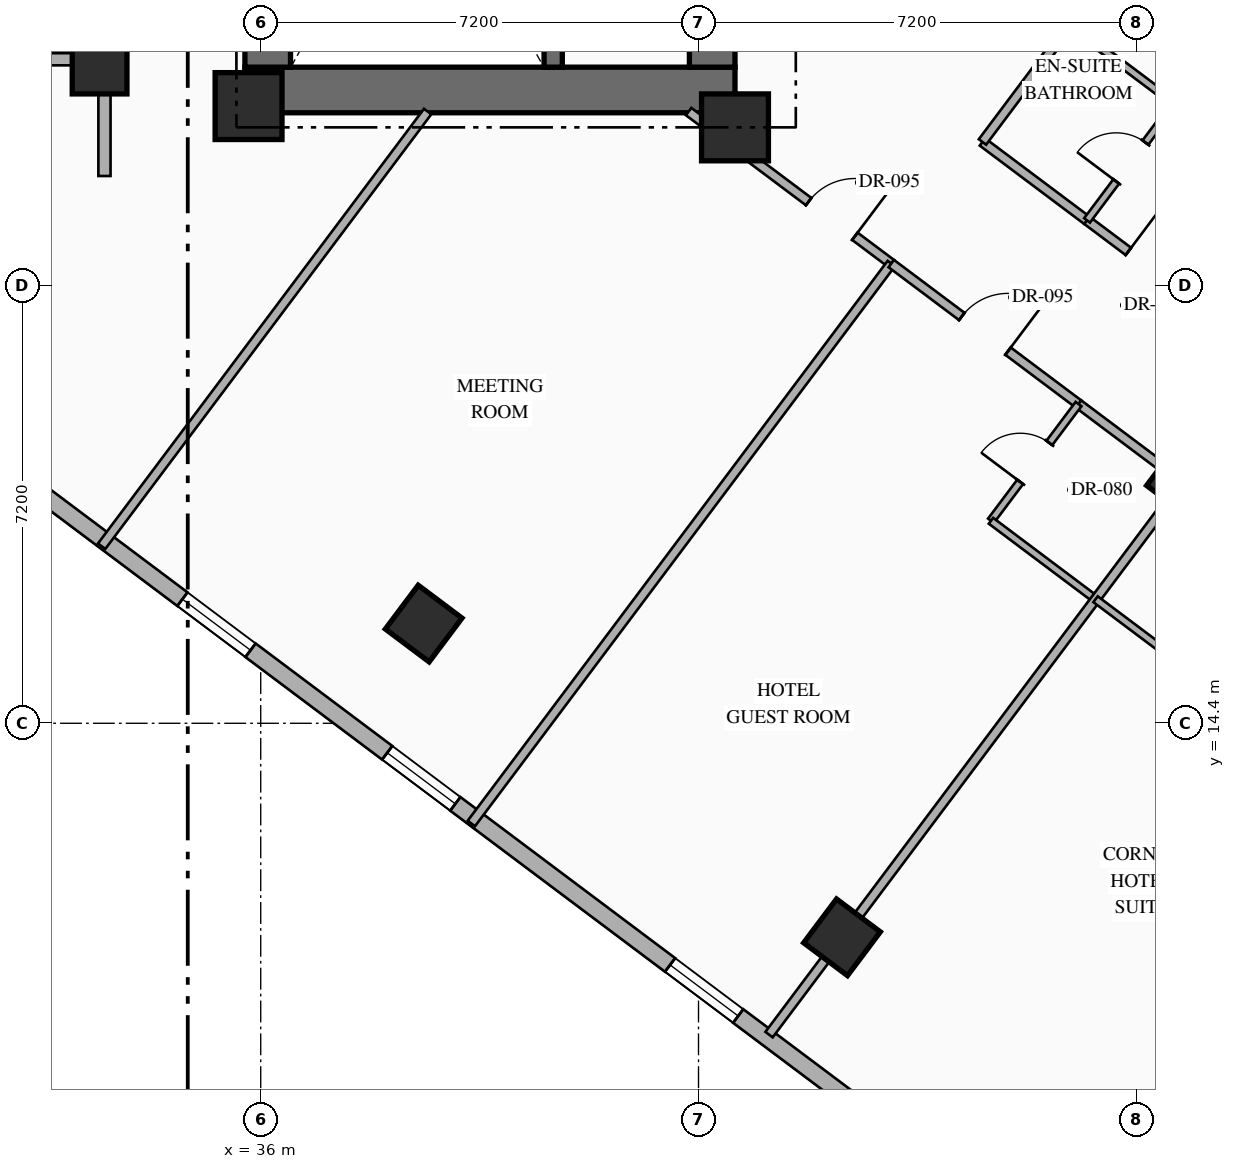
"""IFC4 building model, lengths in metres.
Left out: names, types, materials, properties, quantities, classifications, styles, units other than length and angle.
Written with IfcOpenShell. Run it as: python <this file> out.ifc"""

import sys

from ifc_helpers import new_model, si_unit, direction, frame, frame_2d, origin, origin_2d, place, context, subcontext, project, spatial, rectangle, hollow_rectangle, extrude, element, fill, save


model = new_model("IFC4")
c1 = context("Model", 3, precision=1e-05, world=origin(), true_north=direction((0.0, 1.0)))
c2 = subcontext(c1, "Body", "Model", "MODEL_VIEW")
j1 = project(units=[si_unit("LENGTHUNIT", "METRE"), si_unit("PLANEANGLEUNIT", "RADIAN")], contexts=[c1])
p1 = place(None, origin())
s1 = spatial("IfcSite", under=j1, at=p1, CompositionType="ELEMENT")
p2 = place(p1, origin())
s2 = spatial("IfcBuilding", under=s1, at=p2, CompositionType="ELEMENT")
p3 = place(p2, frame((0.0, 0.0, 74.6)))
s3 = spatial("IfcBuildingStorey", under=s2, at=p3, CompositionType="ELEMENT", Elevation=74.6)
p4 = place(p3, frame((35.74, 24.815, 0.0), z_axis=(0.0, 0.0, 1.0), x_axis=(1.0, 0.0, 0.0)))
e1 = element("IfcWall", 1, at=p4, inside=s3, PredefinedType="SHEAR", context=c2, shape_type="SweptSolid", body=[
    extrude(rectangle(XDim=8.06, YDim=0.75, at=frame_2d((4.03, 0.0))), origin(), (0.0, 0.0, 1.0), 3.35),
])
p5 = place(p3, frame((36.115, 25.19, 0.0), z_axis=(0.0, 0.0, 1.0), x_axis=(0.0, 1.0, 0.0)))
e2 = element("IfcWall", 2, at=p5, inside=s3, PredefinedType="SHEAR", context=c2, shape_type="SweptSolid", body=[
    extrude(rectangle(XDim=9.48, YDim=0.75, at=frame_2d((4.74, 0.0))), origin(), (0.0, 0.0, 1.0), 3.35),
])
p6 = place(p3, frame((43.425, 25.19, 0.0), z_axis=(0.0, 0.0, 1.0), x_axis=(0.0, 1.0, 0.0)))
e3 = element("IfcWall", 3, at=p6, inside=s3, PredefinedType="SHEAR", context=c2, shape_type="SweptSolid", body=[
    extrude(rectangle(XDim=9.48, YDim=0.75, at=frame_2d((4.74, 0.0))), origin(), (0.0, 0.0, 1.0), 3.35),
])
p7 = place(p6, frame((1.51, 0.0, 0.0)))
e4 = element("IfcOpeningElement", 4, at=p7, cuts=e3, PredefinedType="OPENING", context=c2, shape_type="SweptSolid", body=[
    extrude(rectangle(XDim=0.85, YDim=2.08, at=frame_2d((0.425, 1.04))), frame((0.0, 0.385, 0.0), z_axis=(0.0, -1.0, 0.0), x_axis=(1.0, 0.0, 0.0)), (0.0, 0.0, 1.0), 0.77),
])
p8 = place(p6, frame((4.76, 0.0, 0.0)))
e5 = element("IfcOpeningElement", 5, at=p8, cuts=e3, PredefinedType="OPENING", context=c2, shape_type="SweptSolid", body=[
    extrude(rectangle(XDim=0.85, YDim=2.08, at=frame_2d((0.425, 1.04))), frame((0.0, 0.385, 0.0), z_axis=(0.0, -1.0, 0.0), x_axis=(1.0, 0.0, 0.0)), (0.0, 0.0, 1.0), 0.77),
])
p9 = place(p3, frame((40.81, 25.19, 0.0), z_axis=(0.0, 0.0, 1.0), x_axis=(0.0, 1.0, 0.0)))
e6 = element("IfcWall", 6, at=p9, inside=s3, PredefinedType="SHEAR", context=c2, shape_type="SweptSolid", body=[
    extrude(rectangle(XDim=9.48, YDim=0.3, at=frame_2d((4.74, 0.0))), origin(), (0.0, 0.0, 1.0), 3.35),
])
for number, where, z_axis, x_axis in (
    (7, (35.8, 24.55, 0.0), (0.0, 0.0, 1.0), (1.0, 0.0, 0.0)),
    (8, (43.8, 24.2, 0.0), (0.0, 0.0, 1.0), (1.0, 0.0, 0.0)),
):
    element("IfcColumn", number, at=place(p3, frame(where, z_axis=z_axis, x_axis=x_axis)), inside=s3, PredefinedType="COLUMN", context=c2, shape_type="SweptSolid", body=[
        extrude(rectangle(XDim=1.1, YDim=1.1, at=origin_2d()), origin(), (0.0, 0.0, 1.0), 3.35),
    ])
for number, where, z_axis, x_axis in (
    (9, (33.35, 25.2, 0.0), (0.0, 0.0, 1.0), (1.0, 0.0, 0.0)),
    (10, (38.68, 16.04, 0.0), (0.0, 0.0, 1.0), (0.8, -0.6, 0.0)),
    (11, (45.56, 10.88, 0.0), (0.0, 0.0, 1.0), (0.8, -0.6, 0.0)),
    (12, (51.2, 18.4, 0.0), (0.0, 0.0, 1.0), (0.8, -0.6, 0.0)),
):
    element("IfcColumn", number, at=place(p3, frame(where, z_axis=z_axis, x_axis=x_axis)), inside=s3, PredefinedType="COLUMN", context=c2, shape_type="SweptSolid", body=[
        extrude(hollow_rectangle(XDim=0.9, YDim=0.9, WallThickness=0.036, at=origin_2d()), origin(), (0.0, 0.0, 1.0), 3.35),
    ])
p10 = place(p3, frame((44.86, 40.73, 0.0), z_axis=(0.0, 0.0, 1.0), x_axis=(0.800006902154, -0.599990797017, 0.0)))
e13 = element("IfcWall", 13, at=p10, inside=s3, PredefinedType="STANDARD", context=c2, shape_type="SweptSolid", body=[
    extrude(rectangle(XDim=29.712, YDim=0.28, at=frame_2d((14.856, 0.0))), origin(), (0.0, 0.0, 1.0), 3.13),
])
p11 = place(p10, frame((14.249, 0.0, 0.0)))
e14 = element("IfcOpeningElement", 14, at=p11, cuts=e13, PredefinedType="OPENING", context=c2, shape_type="SweptSolid", body=[
    extrude(rectangle(XDim=1.1, YDim=2.2, at=frame_2d((0.55, 1.1))), frame((0.0, 0.15, 0.0), z_axis=(0.0, -1.0, 0.0), x_axis=(1.0, 0.0, 0.0)), (0.0, 0.0, 1.0), 0.3),
])
p12 = place(p10, frame((1.612, 0.0, 0.85)))
e15 = element("IfcOpeningElement", 15, at=p12, cuts=e13, PredefinedType="OPENING", context=c2, shape_type="SweptSolid", body=[
    extrude(rectangle(XDim=1.4, YDim=1.8, at=frame_2d((0.7, 0.9))), frame((0.0, 0.15, 0.0), z_axis=(0.0, -1.0, 0.0), x_axis=(1.0, 0.0, 0.0)), (0.0, 0.0, 1.0), 0.3),
])
p13 = place(p10, frame((5.667, 0.0, 0.85)))
e16 = element("IfcOpeningElement", 16, at=p13, cuts=e13, PredefinedType="OPENING", context=c2, shape_type="SweptSolid", body=[
    extrude(rectangle(XDim=1.4, YDim=1.8, at=frame_2d((0.7, 0.9))), frame((0.0, 0.15, 0.0), z_axis=(0.0, -1.0, 0.0), x_axis=(1.0, 0.0, 0.0)), (0.0, 0.0, 1.0), 0.3),
])
p14 = place(p10, frame((9.912, 0.0, 0.85)))
e17 = element("IfcOpeningElement", 17, at=p14, cuts=e13, PredefinedType="OPENING", context=c2, shape_type="SweptSolid", body=[
    extrude(rectangle(XDim=1.4, YDim=1.8, at=frame_2d((0.7, 0.9))), frame((0.0, 0.15, 0.0), z_axis=(0.0, -1.0, 0.0), x_axis=(1.0, 0.0, 0.0)), (0.0, 0.0, 1.0), 0.3),
])
p15 = place(p10, frame((19.528, 0.0, 0.85)))
e18 = element("IfcOpeningElement", 18, at=p15, cuts=e13, PredefinedType="OPENING", context=c2, shape_type="SweptSolid", body=[
    extrude(rectangle(XDim=1.4, YDim=1.8, at=frame_2d((0.7, 0.9))), frame((0.0, 0.15, 0.0), z_axis=(0.0, -1.0, 0.0), x_axis=(1.0, 0.0, 0.0)), (0.0, 0.0, 1.0), 0.3),
])
p16 = place(p10, frame((23.451, 0.0, 0.85)))
e19 = element("IfcOpeningElement", 19, at=p16, cuts=e13, PredefinedType="OPENING", context=c2, shape_type="SweptSolid", body=[
    extrude(rectangle(XDim=1.4, YDim=1.8, at=frame_2d((0.7, 0.9))), frame((0.0, 0.15, 0.0), z_axis=(0.0, -1.0, 0.0), x_axis=(1.0, 0.0, 0.0)), (0.0, 0.0, 1.0), 0.3),
])
p17 = place(p10, frame((27.852, 0.0, 0.85)))
e20 = element("IfcOpeningElement", 20, at=p17, cuts=e13, PredefinedType="OPENING", context=c2, shape_type="SweptSolid", body=[
    extrude(rectangle(XDim=1.4, YDim=1.8, at=frame_2d((0.7, 0.9))), frame((0.0, 0.15, 0.0), z_axis=(0.0, -1.0, 0.0), x_axis=(1.0, 0.0, 0.0)), (0.0, 0.0, 1.0), 0.3),
])
p18 = place(p3, frame((53.318, 2.487, 0.0), z_axis=(0.0, 0.0, 1.0), x_axis=(-0.800004174678, 0.599994433723, 0.0)))
e21 = element("IfcWall", 21, at=p18, inside=s3, PredefinedType="STANDARD", context=c2, shape_type="SweptSolid", body=[
    extrude(rectangle(XDim=35.089, YDim=0.28, at=frame_2d((17.544, 0.0))), origin(), (0.0, 0.0, 1.0), 3.13),
])
p19 = place(p18, frame((1.931, 0.0, 0.85)))
e22 = element("IfcOpeningElement", 22, at=p19, cuts=e21, PredefinedType="OPENING", context=c2, shape_type="SweptSolid", body=[
    extrude(rectangle(XDim=1.4, YDim=1.8, at=frame_2d((0.7, 0.9))), frame((0.0, 0.15, 0.0), z_axis=(0.0, -1.0, 0.0), x_axis=(1.0, 0.0, 0.0)), (0.0, 0.0, 1.0), 0.3),
])
p20 = place(p18, frame((6.819, 0.0, 0.85)))
e23 = element("IfcOpeningElement", 23, at=p20, cuts=e21, PredefinedType="OPENING", context=c2, shape_type="SweptSolid", body=[
    extrude(rectangle(XDim=1.4, YDim=1.8, at=frame_2d((0.7, 0.9))), frame((0.0, 0.15, 0.0), z_axis=(0.0, -1.0, 0.0), x_axis=(1.0, 0.0, 0.0)), (0.0, 0.0, 1.0), 0.3),
])
p21 = place(p18, frame((11.832, 0.0, 0.85)))
e24 = element("IfcOpeningElement", 24, at=p21, cuts=e21, PredefinedType="OPENING", context=c2, shape_type="SweptSolid", body=[
    extrude(rectangle(XDim=1.4, YDim=1.8, at=frame_2d((0.7, 0.9))), frame((0.0, 0.15, 0.0), z_axis=(0.0, -1.0, 0.0), x_axis=(1.0, 0.0, 0.0)), (0.0, 0.0, 1.0), 0.3),
])
p22 = place(p18, frame((17.647, 0.0, 0.85)))
e25 = element("IfcOpeningElement", 25, at=p22, cuts=e21, PredefinedType="OPENING", context=c2, shape_type="SweptSolid", body=[
    extrude(rectangle(XDim=1.4, YDim=1.8, at=frame_2d((0.7, 0.9))), frame((0.0, 0.15, 0.0), z_axis=(0.0, -1.0, 0.0), x_axis=(1.0, 0.0, 0.0)), (0.0, 0.0, 1.0), 0.3),
])
p23 = place(p18, frame((21.857, 0.0, 0.85)))
e26 = element("IfcOpeningElement", 26, at=p23, cuts=e21, PredefinedType="OPENING", context=c2, shape_type="SweptSolid", body=[
    extrude(rectangle(XDim=1.4, YDim=1.8, at=frame_2d((0.7, 0.9))), frame((0.0, 0.15, 0.0), z_axis=(0.0, -1.0, 0.0), x_axis=(1.0, 0.0, 0.0)), (0.0, 0.0, 1.0), 0.3),
])
p24 = place(p18, frame((26.87, 0.0, 0.85)))
e27 = element("IfcOpeningElement", 27, at=p24, cuts=e21, PredefinedType="OPENING", context=c2, shape_type="SweptSolid", body=[
    extrude(rectangle(XDim=1.4, YDim=1.8, at=frame_2d((0.7, 0.9))), frame((0.0, 0.15, 0.0), z_axis=(0.0, -1.0, 0.0), x_axis=(1.0, 0.0, 0.0)), (0.0, 0.0, 1.0), 0.3),
])
p25 = place(p18, frame((31.757, 0.0, 0.85)))
e28 = element("IfcOpeningElement", 28, at=p25, cuts=e21, PredefinedType="OPENING", context=c2, shape_type="SweptSolid", body=[
    extrude(rectangle(XDim=1.4, YDim=1.8, at=frame_2d((0.7, 0.9))), frame((0.0, 0.15, 0.0), z_axis=(0.0, -1.0, 0.0), x_axis=(1.0, 0.0, 0.0)), (0.0, 0.0, 1.0), 0.3),
])
p26 = place(p3, frame((33.43, 23.4, 0.0), z_axis=(0.0, 0.0, 1.0), x_axis=(0.0, 1.0, 0.0)))
e29 = element("IfcWall", 29, at=p26, inside=s3, PredefinedType="STANDARD", context=c2, shape_type="SweptSolid", body=[
    extrude(rectangle(XDim=4.08, YDim=0.2, at=frame_2d((2.04, 0.0))), origin(), (0.0, 0.0, 1.0), 2.425),
])
p27 = place(p3, frame((25.55, 25.32, 0.0), z_axis=(0.0, 0.0, 1.0), x_axis=(1.0, 0.0, 0.0)))
e30 = element("IfcWall", 30, at=p27, inside=s3, PredefinedType="STANDARD", context=c2, shape_type="SweptSolid", body=[
    extrude(rectangle(XDim=7.88, YDim=0.2, at=frame_2d((3.94, 0.0))), origin(), (0.0, 0.0, 1.0), 2.525),
])
p28 = place(p3, frame((43.037, 24.46, 0.0), z_axis=(0.0, 0.0, 1.0), x_axis=(0.799971872363, -0.600037501685, 0.0)))
e31 = element("IfcWall", 31, at=p28, inside=s3, PredefinedType="PARTITIONING", context=c2, shape_type="SweptSolid", body=[
    extrude(rectangle(XDim=4.167, YDim=0.15, at=frame_2d((2.083, 0.0))), origin(), (0.0, 0.0, 1.0), 2.425),
])
p29 = place(p28, frame((2.468, 0.0, 0.0)))
e32 = element("IfcOpeningElement", 32, at=p29, cuts=e31, PredefinedType="OPENING", context=c2, shape_type="SweptSolid", body=[
    extrude(rectangle(XDim=0.95, YDim=2.15, at=frame_2d((0.475, 1.075))), frame((0.0, 0.085, 0.0), z_axis=(0.0, -1.0, 0.0), x_axis=(1.0, 0.0, 0.0)), (0.0, 0.0, 1.0), 0.17),
])
p30 = place(p3, frame((33.384, 17.312, 0.0), z_axis=(0.0, 0.0, 1.0), x_axis=(0.600008743659, 0.799993442181, 0.0)))
e33 = element("IfcWall", 33, at=p30, inside=s3, PredefinedType="PARTITIONING", context=c2, shape_type="SweptSolid", body=[
    extrude(rectangle(XDim=8.935, YDim=0.15, at=frame_2d((4.468, 0.0))), origin(), (0.0, 0.0, 1.0), 3.13),
])
p31 = place(p3, frame((39.464, 12.752, 0.0), z_axis=(0.0, 0.0, 1.0), x_axis=(0.6, 0.8, 0.0)))
e34 = element("IfcWall", 34, at=p31, inside=s3, PredefinedType="PARTITIONING", context=c2, shape_type="SweptSolid", body=[
    extrude(rectangle(XDim=11.51, YDim=0.15, at=frame_2d((5.755, 0.0))), origin(), (0.0, 0.0, 1.0), 3.13),
])
p32 = place(p3, frame((47.87, 23.96, 0.0), z_axis=(0.0, 0.0, 1.0), x_axis=(0.79998637334, -0.60001816845, 0.0)))
e35 = element("IfcWall", 35, at=p32, inside=s3, PredefinedType="PARTITIONING", context=c2, shape_type="SweptSolid", body=[
    extrude(rectangle(XDim=2.15, YDim=0.15, at=frame_2d((1.075, 0.0))), origin(), (0.0, 0.0, 1.0), 2.775),
])
p33 = place(p3, frame((49.59, 22.67, 0.0), z_axis=(0.0, 0.0, 1.0), x_axis=(0.800011056104, -0.599985258246, 0.0)))
e36 = element("IfcWall", 36, at=p33, inside=s3, PredefinedType="PARTITIONING", context=c2, shape_type="SweptSolid", body=[
    extrude(rectangle(XDim=2.65, YDim=0.15, at=frame_2d((1.325, 0.0))), origin(), (0.0, 0.0, 1.0), 2.775),
])
p34 = place(p33, frame((0.85, 0.0, 0.0)))
e37 = element("IfcOpeningElement", 37, at=p34, cuts=e36, PredefinedType="OPENING", context=c2, shape_type="SweptSolid", body=[
    extrude(rectangle(XDim=0.95, YDim=2.15, at=frame_2d((0.475, 1.075))), frame((0.0, 0.085, 0.0), z_axis=(0.0, -1.0, 0.0), x_axis=(1.0, 0.0, 0.0)), (0.0, 0.0, 1.0), 0.17),
])
p35 = place(p3, frame((49.59, 22.67, 0.0), z_axis=(0.0, 0.0, 1.0), x_axis=(0.599951172744, 0.800036618114, 0.0)))
e38 = element("IfcWall", 38, at=p35, inside=s3, PredefinedType="PARTITIONING", context=c2, shape_type="SweptSolid", body=[
    extrude(rectangle(XDim=2.4, YDim=0.12, at=frame_2d((1.2, 0.0))), origin(), (0.0, 0.0, 1.0), 3.13),
])
p36 = place(p35, frame((0.8, 0.0, 0.0)))
e39 = element("IfcOpeningElement", 39, at=p36, cuts=e38, PredefinedType="OPENING", context=c2, shape_type="SweptSolid", body=[
    extrude(rectangle(XDim=0.8, YDim=2.06, at=frame_2d((0.4, 1.03))), frame((0.0, 0.07, 0.0), z_axis=(0.0, -1.0, 0.0), x_axis=(1.0, 0.0, 0.0)), (0.0, 0.0, 1.0), 0.14),
])
p37 = place(p3, frame((49.31, 25.88, 0.0), z_axis=(0.0, 0.0, 1.0), x_axis=(0.800040880289, -0.59994548908, 0.0)))
e40 = element("IfcWall", 40, at=p37, inside=s3, PredefinedType="PARTITIONING", context=c2, shape_type="SweptSolid", body=[
    extrude(rectangle(XDim=2.15, YDim=0.12, at=frame_2d((1.075, 0.0))), origin(), (0.0, 0.0, 1.0), 3.13),
])
p38 = place(p3, frame((47.87, 23.96, 0.0), z_axis=(0.0, 0.0, 1.0), x_axis=(0.599996617946, 0.80000253653, 0.0)))
e41 = element("IfcWall", 41, at=p38, inside=s3, PredefinedType="PARTITIONING", context=c2, shape_type="SweptSolid", body=[
    extrude(rectangle(XDim=11.55, YDim=0.15, at=frame_2d((5.775, 0.0))), origin(), (0.0, 0.0, 1.0), 3.13),
])
p39 = place(p3, frame((46.37, 21.96, 0.0), z_axis=(0.0, 0.0, 1.0), x_axis=(0.799977170108, -0.600030438649, 0.0)))
e42 = element("IfcWall", 42, at=p39, inside=s3, PredefinedType="PARTITIONING", context=c2, shape_type="SweptSolid", body=[
    extrude(rectangle(XDim=3.85, YDim=0.15, at=frame_2d((1.925, 0.0))), origin(), (0.0, 0.0, 1.0), 2.425),
])
p40 = place(p39, frame((1.45, 0.0, 0.0)))
e43 = element("IfcOpeningElement", 43, at=p40, cuts=e42, PredefinedType="OPENING", context=c2, shape_type="SweptSolid", body=[
    extrude(rectangle(XDim=0.95, YDim=2.15, at=frame_2d((0.475, 1.075))), frame((0.0, 0.085, 0.0), z_axis=(0.0, -1.0, 0.0), x_axis=(1.0, 0.0, 0.0)), (0.0, 0.0, 1.0), 0.17),
])
p41 = place(p3, frame((49.45, 19.65, 0.0), z_axis=(0.0, 0.0, 1.0), x_axis=(0.800040880289, -0.59994548908, 0.0)))
e44 = element("IfcWall", 44, at=p41, inside=s3, PredefinedType="PARTITIONING", context=c2, shape_type="SweptSolid", body=[
    extrude(rectangle(XDim=2.15, YDim=0.15, at=frame_2d((1.075, 0.0))), origin(), (0.0, 0.0, 1.0), 2.425),
])
p42 = place(p3, frame((48.01, 17.73, 0.0), z_axis=(0.0, 0.0, 1.0), x_axis=(0.6, 0.8, 0.0)))
e45 = element("IfcWall", 45, at=p42, inside=s3, PredefinedType="PARTITIONING", context=c2, shape_type="SweptSolid", body=[
    extrude(rectangle(XDim=2.4, YDim=0.12, at=frame_2d((1.2, 0.0))), origin(), (0.0, 0.0, 1.0), 3.13),
])
p43 = place(p42, frame((0.8, 0.0, 0.0)))
e46 = element("IfcOpeningElement", 46, at=p43, cuts=e45, PredefinedType="OPENING", context=c2, shape_type="SweptSolid", body=[
    extrude(rectangle(XDim=0.8, YDim=2.06, at=frame_2d((0.4, 1.03))), frame((0.0, 0.07, 0.0), z_axis=(0.0, -1.0, 0.0), x_axis=(1.0, 0.0, 0.0)), (0.0, 0.0, 1.0), 0.14),
])
p44 = place(p3, frame((48.01, 17.73, 0.0), z_axis=(0.0, 0.0, 1.0), x_axis=(0.79998637334, -0.60001816845, 0.0)))
e47 = element("IfcWall", 47, at=p44, inside=s3, PredefinedType="PARTITIONING", context=c2, shape_type="SweptSolid", body=[
    extrude(rectangle(XDim=2.15, YDim=0.12, at=frame_2d((1.075, 0.0))), origin(), (0.0, 0.0, 1.0), 3.13),
])
p45 = place(p3, frame((44.36, 9.28, 0.0), z_axis=(0.0, 0.0, 1.0), x_axis=(0.599986233332, 0.800010324816, 0.0)))
e48 = element("IfcWall", 48, at=p45, inside=s3, PredefinedType="PARTITIONING", context=c2, shape_type="SweptSolid", body=[
    extrude(rectangle(XDim=11.35, YDim=0.15, at=frame_2d((5.675, 0.0))), origin(), (0.0, 0.0, 1.0), 2.425),
])
p46 = place(p3, frame((49.73, 16.44, 0.0), z_axis=(0.0, 0.0, 1.0), x_axis=(0.79998637334, -0.60001816845, 0.0)))
e49 = element("IfcWall", 49, at=p46, inside=s3, PredefinedType="PARTITIONING", context=c2, shape_type="SweptSolid", body=[
    extrude(rectangle(XDim=2.15, YDim=0.12, at=frame_2d((1.075, 0.0))), origin(), (0.0, 0.0, 1.0), 3.13),
])
p47 = place(p3, frame((49.8, 5.2, 0.0), z_axis=(0.0, 0.0, 1.0), x_axis=(0.6, 0.8, 0.0)))
e50 = element("IfcWall", 50, at=p47, inside=s3, PredefinedType="PARTITIONING", context=c2, shape_type="SweptSolid", body=[
    extrude(rectangle(XDim=11.35, YDim=0.15, at=frame_2d((5.675, 0.0))), origin(), (0.0, 0.0, 1.0), 3.13),
])
p48 = place(p21, origin())
e51 = element("IfcWindow", 51, at=p48, inside=s3, PartitioningType="SINGLE_PANEL", PredefinedType="WINDOW", context=c2, shape_type="SweptSolid", body=[
    extrude(rectangle(XDim=1.4, YDim=1.8, at=frame_2d((0.7, 0.9))), frame((0.0, 0.03, 0.0), z_axis=(0.0, -1.0, 0.0), x_axis=(1.0, 0.0, 0.0)), (0.0, 0.0, 1.0), 0.06),
])
fill(e24, e51)
p49 = place(p22, origin())
e52 = element("IfcWindow", 52, at=p49, inside=s3, PartitioningType="SINGLE_PANEL", PredefinedType="WINDOW", context=c2, shape_type="SweptSolid", body=[
    extrude(rectangle(XDim=1.4, YDim=1.8, at=frame_2d((0.7, 0.9))), frame((0.0, 0.03, 0.0), z_axis=(0.0, -1.0, 0.0), x_axis=(1.0, 0.0, 0.0)), (0.0, 0.0, 1.0), 0.06),
])
fill(e25, e52)
p50 = place(p23, origin())
e53 = element("IfcWindow", 53, at=p50, inside=s3, PartitioningType="SINGLE_PANEL", PredefinedType="WINDOW", context=c2, shape_type="SweptSolid", body=[
    extrude(rectangle(XDim=1.4, YDim=1.8, at=frame_2d((0.7, 0.9))), frame((0.0, 0.03, 0.0), z_axis=(0.0, -1.0, 0.0), x_axis=(1.0, 0.0, 0.0)), (0.0, 0.0, 1.0), 0.06),
])
fill(e26, e53)
p51 = place(p29, origin())
e54 = element("IfcDoor", 54, at=p51, inside=s3, OperationType="SINGLE_SWING_RIGHT", PredefinedType="DOOR", context=c2, shape_type="SweptSolid", body=[
    extrude(rectangle(XDim=0.95, YDim=2.15, at=frame_2d((0.475, 1.075))), frame((0.0, 0.025, 0.0), z_axis=(0.0, -1.0, 0.0), x_axis=(1.0, 0.0, 0.0)), (0.0, 0.0, 1.0), 0.05),
])
fill(e32, e54)
p52 = place(p34, origin())
e55 = element("IfcDoor", 55, at=p52, inside=s3, OperationType="SINGLE_SWING_LEFT", PredefinedType="DOOR", context=c2, shape_type="SweptSolid", body=[
    extrude(rectangle(XDim=0.95, YDim=2.15, at=frame_2d((0.475, 1.075))), frame((0.0, 0.025, 0.0), z_axis=(0.0, -1.0, 0.0), x_axis=(1.0, 0.0, 0.0)), (0.0, 0.0, 1.0), 0.05),
])
fill(e37, e55)
p53 = place(p36, origin())
e56 = element("IfcDoor", 56, at=p53, inside=s3, OperationType="SINGLE_SWING_LEFT", PredefinedType="DOOR", context=c2, shape_type="SweptSolid", body=[
    extrude(rectangle(XDim=0.8, YDim=2.06, at=frame_2d((0.4, 1.03))), frame((0.0, 0.025, 0.0), z_axis=(0.0, -1.0, 0.0), x_axis=(1.0, 0.0, 0.0)), (0.0, 0.0, 1.0), 0.05),
])
fill(e39, e56)
p54 = place(p40, origin())
e57 = element("IfcDoor", 57, at=p54, inside=s3, OperationType="SINGLE_SWING_RIGHT", PredefinedType="DOOR", context=c2, shape_type="SweptSolid", body=[
    extrude(rectangle(XDim=0.95, YDim=2.15, at=frame_2d((0.475, 1.075))), frame((0.0, 0.025, 0.0), z_axis=(0.0, -1.0, 0.0), x_axis=(1.0, 0.0, 0.0)), (0.0, 0.0, 1.0), 0.05),
])
fill(e43, e57)
p55 = place(p43, origin())
e58 = element("IfcDoor", 58, at=p55, inside=s3, OperationType="SINGLE_SWING_LEFT", PredefinedType="DOOR", context=c2, shape_type="SweptSolid", body=[
    extrude(rectangle(XDim=0.8, YDim=2.06, at=frame_2d((0.4, 1.03))), frame((0.0, 0.025, 0.0), z_axis=(0.0, -1.0, 0.0), x_axis=(1.0, 0.0, 0.0)), (0.0, 0.0, 1.0), 0.05),
])
fill(e46, e58)
save(model, sys.argv[1])
